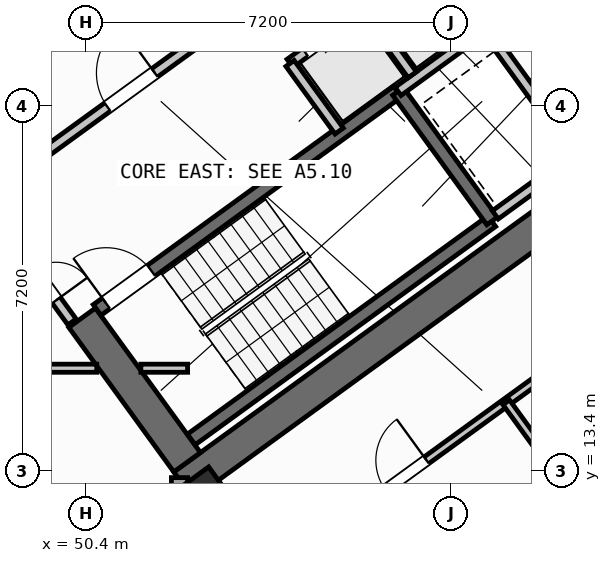
"""IFC4 building model, lengths in metres.
Left out: names, types, materials, properties, quantities, classifications, styles, units other than length and angle.
Written with IfcOpenShell. Run it as: python <this file> out.ifc"""

import sys

from ifc_helpers import new_model, si_unit, direction, frame, frame_2d, origin, origin_2d, place, context, subcontext, project, spatial, rectangle, hollow_rectangle, extrude, source, transform, mapped, element, fill, save


model = new_model("IFC4")
c1 = context("Model", 3, precision=1e-05, world=origin(), true_north=direction((0.0, 1.0)))
c2 = subcontext(c1, "Body", "Model", "MODEL_VIEW")
j1 = project(units=[si_unit("LENGTHUNIT", "METRE"), si_unit("PLANEANGLEUNIT", "RADIAN")], contexts=[c1])
p1 = place(None, origin())
s1 = spatial("IfcSite", under=j1, at=p1, CompositionType="ELEMENT")
p2 = place(p1, origin())
s2 = spatial("IfcBuilding", under=s1, at=p2, CompositionType="ELEMENT")
p3 = place(p2, frame((0.0, 0.0, 34.8)))
s3 = spatial("IfcBuildingStorey", under=s2, at=p3, CompositionType="ELEMENT", Elevation=34.8)
p4 = place(p3, frame((52.318, 13.11, 0.0), z_axis=(0.0, 0.0, 1.0), x_axis=(0.809019445368, 0.587781878776, 0.0)))
e1 = element("IfcWall", 1, at=p4, inside=s3, PredefinedType="SHEAR", context=c2, shape_type="SweptSolid", body=[
    extrude(rectangle(XDim=12.44, YDim=0.65, at=frame_2d((6.22, 0.0))), origin(), (0.0, 0.0, 1.0), 3.35),
])
p5 = place(p3, frame((52.39, 13.564, 0.0), z_axis=(0.0, 0.0, 1.0), x_axis=(-0.58779688989, 0.809008539037, 0.0)))
e2 = element("IfcWall", 2, at=p5, inside=s3, PredefinedType="SHEAR", context=c2, shape_type="SweptSolid", body=[
    extrude(rectangle(XDim=3.525, YDim=0.65, at=frame_2d((1.763, 0.0))), origin(), (0.0, 0.0, 1.0), 3.35),
])
m1 = source(origin(), c2, "Body", "SweptSolid", [
    extrude(hollow_rectangle(XDim=1.0, YDim=1.0, WallThickness=0.04, at=origin_2d()), origin(), (0.0, 0.0, 1.0), 3.6),
])
p6 = place(p3, frame((52.705, 12.773, 0.0), z_axis=(0.0, 0.0, 1.0), x_axis=(0.809016994375, 0.587785252292, 0.0)))
e3 = element("IfcColumn", 3, at=p6, inside=s3, PredefinedType="COLUMN", context=c2, shape_type="MappedRepresentation", body=[
    mapped(m1, transform((0.0, 0.0, 0.0), scale=1.0)),
])
p7 = place(p3, frame((58.455, 35.484, 0.0), z_axis=(0.0, 0.0, 1.0), x_axis=(0.587783625747, -0.809018176127, 0.0)))
e4 = element("IfcWall", 4, at=p7, inside=s3, PredefinedType="STANDARD", context=c2, shape_type="SweptSolid", body=[
    extrude(rectangle(XDim=21.587, YDim=0.32, at=frame_2d((10.794, 0.0))), origin(), (0.0, 0.0, 1.0), 2.725),
])
p8 = place(p7, frame((1.529, 0.0, 0.85)))
e5 = element("IfcOpeningElement", 5, at=p8, cuts=e4, PredefinedType="OPENING", context=c2, shape_type="SweptSolid", body=[
    extrude(rectangle(XDim=1.8, YDim=1.5, at=frame_2d((0.9, 0.75))), frame((0.0, 0.17, 0.0), z_axis=(0.0, -1.0, 0.0), x_axis=(1.0, 0.0, 0.0)), (0.0, 0.0, 1.0), 0.34),
])
p9 = place(p7, frame((10.444, 0.0, 0.85)))
e6 = element("IfcOpeningElement", 6, at=p9, cuts=e4, PredefinedType="OPENING", context=c2, shape_type="SweptSolid", body=[
    extrude(rectangle(XDim=1.8, YDim=1.5, at=frame_2d((0.9, 0.75))), frame((0.0, 0.17, 0.0), z_axis=(0.0, -1.0, 0.0), x_axis=(1.0, 0.0, 0.0)), (0.0, 0.0, 1.0), 0.34),
])
p10 = place(p7, frame((17.595, 0.0, 0.85)))
e7 = element("IfcOpeningElement", 7, at=p10, cuts=e4, PredefinedType="OPENING", context=c2, shape_type="SweptSolid", body=[
    extrude(rectangle(XDim=1.5, YDim=1.5, at=frame_2d((0.75, 0.75))), frame((0.0, 0.17, 0.0), z_axis=(0.0, -1.0, 0.0), x_axis=(1.0, 0.0, 0.0)), (0.0, 0.0, 1.0), 0.34),
])
p11 = place(p3, frame((71.098, 17.731, 0.0), z_axis=(0.0, 0.0, 1.0), x_axis=(-0.809021120468, -0.587779573171, 0.0)))
e8 = element("IfcWall", 8, at=p11, inside=s3, PredefinedType="STANDARD", context=c2, shape_type="SweptSolid", body=[
    extrude(rectangle(XDim=17.588, YDim=0.32, at=frame_2d((8.794, 0.0))), origin(), (0.0, 0.0, 1.0), 3.35),
])
p12 = place(p11, frame((1.624, 0.0, 0.0)))
e9 = element("IfcOpeningElement", 9, at=p12, cuts=e8, PredefinedType="OPENING", context=c2, shape_type="SweptSolid", body=[
    extrude(rectangle(XDim=1.05, YDim=2.15, at=frame_2d((0.525, 1.075))), frame((0.0, 0.17, 0.0), z_axis=(0.0, -1.0, 0.0), x_axis=(1.0, 0.0, 0.0)), (0.0, 0.0, 1.0), 0.34),
])
p13 = place(p11, frame((4.104, 0.0, 1.0)))
e10 = element("IfcOpeningElement", 10, at=p13, cuts=e8, PredefinedType="OPENING", context=c2, shape_type="SweptSolid", body=[
    extrude(rectangle(XDim=0.9, YDim=1.25, at=frame_2d((0.45, 0.625))), frame((0.0, 0.17, 0.0), z_axis=(0.0, -1.0, 0.0), x_axis=(1.0, 0.0, 0.0)), (0.0, 0.0, 1.0), 0.34),
])
p14 = place(p11, frame((7.879, 0.0, 0.85)))
e11 = element("IfcOpeningElement", 11, at=p14, cuts=e8, PredefinedType="OPENING", context=c2, shape_type="SweptSolid", body=[
    extrude(rectangle(XDim=1.8, YDim=1.5, at=frame_2d((0.9, 0.75))), frame((0.0, 0.17, 0.0), z_axis=(0.0, -1.0, 0.0), x_axis=(1.0, 0.0, 0.0)), (0.0, 0.0, 1.0), 0.34),
])
p15 = place(p11, frame((13.529, 0.0, 0.85)))
e12 = element("IfcOpeningElement", 12, at=p15, cuts=e8, PredefinedType="OPENING", context=c2, shape_type="SweptSolid", body=[
    extrude(rectangle(XDim=1.5, YDim=1.5, at=frame_2d((0.75, 0.75))), frame((0.0, 0.17, 0.0), z_axis=(0.0, -1.0, 0.0), x_axis=(1.0, 0.0, 0.0)), (0.0, 0.0, 1.0), 0.34),
])
p16 = place(p3, frame((52.24, 13.261, 0.0), z_axis=(0.0, 0.0, 1.0), x_axis=(0.0, -1.0, 0.0)))
e13 = element("IfcWall", 13, at=p16, inside=s3, PredefinedType="STANDARD", context=c2, shape_type="SweptSolid", body=[
    extrude(rectangle(XDim=9.795, YDim=0.32, at=frame_2d((4.897, 0.0))), origin(), (0.0, 0.0, 1.0), 3.35),
])
p17 = place(p16, frame((2.199, 0.0, 0.8)))
e14 = element("IfcOpeningElement", 14, at=p17, cuts=e13, PredefinedType="OPENING", context=c2, shape_type="SweptSolid", body=[
    extrude(rectangle(XDim=2.1, YDim=1.55, at=frame_2d((1.05, 0.775))), frame((0.0, 0.17, 0.0), z_axis=(0.0, -1.0, 0.0), x_axis=(1.0, 0.0, 0.0)), (0.0, 0.0, 1.0), 0.34),
])
p18 = place(p16, frame((6.88, 0.0, 0.85)))
e15 = element("IfcOpeningElement", 15, at=p18, cuts=e13, PredefinedType="OPENING", context=c2, shape_type="SweptSolid", body=[
    extrude(rectangle(XDim=1.8, YDim=1.5, at=frame_2d((0.9, 0.75))), frame((0.0, 0.17, 0.0), z_axis=(0.0, -1.0, 0.0), x_axis=(1.0, 0.0, 0.0)), (0.0, 0.0, 1.0), 0.34),
])
p19 = place(p3, frame((52.472, 14.013, 0.0), z_axis=(0.0, 0.0, 1.0), x_axis=(0.809028366311, 0.587769599847, 0.0)))
e16 = element("IfcWall", 16, at=p19, inside=s3, PredefinedType="SHEAR", context=c2, shape_type="SweptSolid", body=[
    extrude(rectangle(XDim=7.33, YDim=0.26, at=frame_2d((3.665, 0.0))), origin(), (0.0, 0.0, 1.0), 3.35),
])
p20 = place(p3, frame((50.615, 16.57, 0.0), z_axis=(0.0, 0.0, 1.0), x_axis=(0.809028366311, 0.587769599847, 0.0)))
e17 = element("IfcWall", 17, at=p20, inside=s3, PredefinedType="SHEAR", context=c2, shape_type="SweptSolid", body=[
    extrude(rectangle(XDim=7.33, YDim=0.26, at=frame_2d((3.665, 0.0))), origin(), (0.0, 0.0, 1.0), 3.35),
])
p21 = place(p20, frame((0.22, 0.0, 0.0)))
e18 = element("IfcOpeningElement", 18, at=p21, cuts=e17, PredefinedType="OPENING", context=c2, shape_type="SweptSolid", body=[
    extrude(rectangle(XDim=1.1, YDim=2.1, at=frame_2d((0.55, 1.05))), frame((0.0, 0.14, 0.0), z_axis=(0.0, -1.0, 0.0), x_axis=(1.0, 0.0, 0.0)), (0.0, 0.0, 1.0), 0.28),
])
p22 = place(p3, frame((58.41, 18.327, 0.0), z_axis=(0.0, 0.0, 1.0), x_axis=(-0.58776738483, 0.809029975545, 0.0)))
e19 = element("IfcWall", 19, at=p22, inside=s3, PredefinedType="SHEAR", context=c2, shape_type="SweptSolid", body=[
    extrude(rectangle(XDim=3.16, YDim=0.26, at=frame_2d((1.58, 0.0))), origin(), (0.0, 0.0, 1.0), 3.35),
])
p23 = place(p3, frame((47.106, 21.437, 0.0), z_axis=(0.0, 0.0, 1.0), x_axis=(0.809012514015, 0.58779141893, 0.0)))
e20 = element("IfcWall", 20, at=p23, inside=s3, PredefinedType="STANDARD", context=c2, shape_type="SweptSolid", body=[
    extrude(rectangle(XDim=3.398, YDim=0.2, at=frame_2d((1.699, 0.0))), origin(), (0.0, 0.0, 1.0), 3.34),
])
p24 = place(p23, frame((0.408, 0.0, 0.0)))
e21 = element("IfcOpeningElement", 21, at=p24, cuts=e20, PredefinedType="OPENING", context=c2, shape_type="SweptSolid", body=[
    extrude(rectangle(XDim=1.3, YDim=2.2, at=frame_2d((0.65, 1.1))), frame((0.0, 0.11, 0.0), z_axis=(0.0, -1.0, 0.0), x_axis=(1.0, 0.0, 0.0)), (0.0, 0.0, 1.0), 0.22),
])
p25 = place(p3, frame((48.799, 19.107, 0.0), z_axis=(0.0, 0.0, 1.0), x_axis=(0.809012959416, 0.587790805897, 0.0)))
e22 = element("IfcWall", 22, at=p25, inside=s3, PredefinedType="STANDARD", context=c2, shape_type="SweptSolid", body=[
    extrude(rectangle(XDim=5.718, YDim=0.2, at=frame_2d((2.859, 0.0))), origin(), (0.0, 0.0, 1.0), 3.34),
])
p26 = place(p25, frame((2.498, 0.0, 0.0)))
e23 = element("IfcOpeningElement", 23, at=p26, cuts=e22, PredefinedType="OPENING", context=c2, shape_type="SweptSolid", body=[
    extrude(rectangle(XDim=1.15, YDim=2.1, at=frame_2d((0.575, 1.05))), frame((0.0, 0.11, 0.0), z_axis=(0.0, -1.0, 0.0), x_axis=(1.0, 0.0, 0.0)), (0.0, 0.0, 1.0), 0.22),
])
p27 = place(p3, frame((56.553, 20.884, 0.0), z_axis=(0.0, 0.0, 1.0), x_axis=(0.809035789462, 0.587759382205, 0.0)))
e24 = element("IfcWall", 24, at=p27, inside=s3, PredefinedType="STANDARD", context=c2, shape_type="SweptSolid", body=[
    extrude(rectangle(XDim=3.768, YDim=0.2, at=frame_2d((1.884, 0.0))), origin(), (0.0, 0.0, 1.0), 3.34),
])
p28 = place(p27, frame((2.65, 0.0, 0.0)))
e25 = element("IfcOpeningElement", 25, at=p28, cuts=e24, PredefinedType="OPENING", context=c2, shape_type="SweptSolid", body=[
    extrude(rectangle(XDim=0.86, YDim=2.05, at=frame_2d((0.43, 1.025))), frame((0.0, 0.11, 0.0), z_axis=(0.0, -1.0, 0.0), x_axis=(1.0, 0.0, 0.0)), (0.0, 0.0, 1.0), 0.22),
])
p29 = place(p3, frame((54.421, 21.436, 0.0), z_axis=(0.0, 0.0, 1.0), x_axis=(0.809013710463, 0.587789772183, 0.0)))
e26 = element("IfcWall", 26, at=p29, inside=s3, PredefinedType="STANDARD", context=c2, shape_type="SweptSolid", body=[
    extrude(rectangle(XDim=5.36, YDim=0.2, at=frame_2d((2.68, 0.0))), origin(), (0.0, 0.0, 1.0), 3.34),
])
p30 = place(p29, frame((0.37, 0.0, 0.0)))
e27 = element("IfcOpeningElement", 27, at=p30, cuts=e26, PredefinedType="OPENING", context=c2, shape_type="SweptSolid", body=[
    extrude(rectangle(XDim=1.1, YDim=2.15, at=frame_2d((0.55, 1.075))), frame((0.0, 0.11, 0.0), z_axis=(0.0, -1.0, 0.0), x_axis=(1.0, 0.0, 0.0)), (0.0, 0.0, 1.0), 0.22),
])
p31 = place(p29, frame((2.17, 0.0, 0.0)))
e28 = element("IfcOpeningElement", 28, at=p31, cuts=e26, PredefinedType="OPENING", context=c2, shape_type="SweptSolid", body=[
    extrude(rectangle(XDim=1.1, YDim=2.15, at=frame_2d((0.55, 1.075))), frame((0.0, 0.11, 0.0), z_axis=(0.0, -1.0, 0.0), x_axis=(1.0, 0.0, 0.0)), (0.0, 0.0, 1.0), 0.22),
])
p32 = place(p29, frame((3.97, 0.0, 0.0)))
e29 = element("IfcOpeningElement", 29, at=p32, cuts=e26, PredefinedType="OPENING", context=c2, shape_type="SweptSolid", body=[
    extrude(rectangle(XDim=1.1, YDim=2.15, at=frame_2d((0.55, 1.075))), frame((0.0, 0.11, 0.0), z_axis=(0.0, -1.0, 0.0), x_axis=(1.0, 0.0, 0.0)), (0.0, 0.0, 1.0), 0.22),
])
p33 = place(p3, frame((55.391, 20.102, 0.0), z_axis=(0.0, 0.0, 1.0), x_axis=(-0.58778447739, 0.809017557374, 0.0)))
e30 = element("IfcWall", 30, at=p33, inside=s3, PredefinedType="STANDARD", context=c2, shape_type="SweptSolid", body=[
    extrude(rectangle(XDim=1.65, YDim=0.2, at=frame_2d((0.825, 0.0))), origin(), (0.0, 0.0, 1.0), 3.34),
])
p34 = place(p3, frame((56.834, 21.212, 0.0), z_axis=(0.0, 0.0, 1.0), x_axis=(-0.58776738483, 0.809029975545, 0.0)))
e31 = element("IfcWall", 31, at=p34, inside=s3, PredefinedType="STANDARD", context=c2, shape_type="SweptSolid", body=[
    extrude(rectangle(XDim=1.58, YDim=0.2, at=frame_2d((0.79, 0.0))), origin(), (0.0, 0.0, 1.0), 3.34),
])
p35 = place(p3, frame((60.067, 19.655, 0.0), z_axis=(0.0, 0.0, 1.0), x_axis=(-0.587800520745, 0.809005900975, 0.0)))
e32 = element("IfcWall", 32, at=p35, inside=s3, PredefinedType="STANDARD", context=c2, shape_type="SweptSolid", body=[
    extrude(rectangle(XDim=2.66, YDim=0.2, at=frame_2d((1.33, 0.0))), origin(), (0.0, 0.0, 1.0), 3.34),
])
p36 = place(p3, frame((58.472, 18.447, 0.0), z_axis=(0.0, 0.0, 1.0), x_axis=(0.809022487728, 0.587777691266, 0.0)))
e33 = element("IfcWall", 33, at=p36, inside=s3, PredefinedType="STANDARD", context=c2, shape_type="SweptSolid", body=[
    extrude(rectangle(XDim=3.648, YDim=0.2, at=frame_2d((1.824, 0.0))), origin(), (0.0, 0.0, 1.0), 3.34),
])
p37 = place(p3, frame((35.296, 15.42, 0.0), z_axis=(0.0, 0.0, 1.0), x_axis=(1.0, 0.0, 0.0)))
e34 = element("IfcWall", 34, at=p37, inside=s3, PredefinedType="PARTITIONING", context=c2, shape_type="SweptSolid", body=[
    extrude(rectangle(XDim=15.311, YDim=0.16, at=frame_2d((7.655, 0.0))), origin(), (0.0, 0.0, 1.0), 3.34),
])
p38 = place(p37, frame((0.91, 0.0, 0.0)))
e35 = element("IfcOpeningElement", 35, at=p38, cuts=e34, PredefinedType="OPENING", context=c2, shape_type="SweptSolid", body=[
    extrude(rectangle(XDim=1.0, YDim=2.1, at=frame_2d((0.5, 1.05))), frame((0.0, 0.09, 0.0), z_axis=(0.0, -1.0, 0.0), x_axis=(1.0, 0.0, 0.0)), (0.0, 0.0, 1.0), 0.18),
])
p39 = place(p37, frame((8.74, 0.0, 0.0)))
e36 = element("IfcOpeningElement", 36, at=p39, cuts=e34, PredefinedType="OPENING", context=c2, shape_type="SweptSolid", body=[
    extrude(rectangle(XDim=1.0, YDim=2.1, at=frame_2d((0.5, 1.05))), frame((0.0, 0.09, 0.0), z_axis=(0.0, -1.0, 0.0), x_axis=(1.0, 0.0, 0.0)), (0.0, 0.0, 1.0), 0.18),
])
p40 = place(p3, frame((51.477, 15.42, 0.0), z_axis=(0.0, 0.0, 1.0), x_axis=(1.0, 0.0, 0.0)))
e37 = element("IfcWall", 37, at=p40, inside=s3, PredefinedType="PARTITIONING", context=c2, shape_type="SweptSolid", body=[
    extrude(rectangle(XDim=0.923, YDim=0.16, at=frame_2d((0.461, 0.0))), origin(), (0.0, 0.0, 1.0), 3.34),
])
p41 = place(p3, frame((50.119, 16.333, 0.0), z_axis=(0.0, 0.0, 1.0), x_axis=(-0.587749856981, 0.809042709391, 0.0)))
e38 = element("IfcWall", 38, at=p41, inside=s3, PredefinedType="STANDARD", context=c2, shape_type="SweptSolid", body=[
    extrude(rectangle(XDim=2.96, YDim=0.2, at=frame_2d((1.48, 0.0))), origin(), (0.0, 0.0, 1.0), 3.34),
])
p42 = place(p41, frame((0.53, 0.0, 0.0)))
e39 = element("IfcOpeningElement", 39, at=p42, cuts=e38, PredefinedType="OPENING", context=c2, shape_type="SweptSolid", body=[
    extrude(rectangle(XDim=1.5, YDim=2.15, at=frame_2d((0.75, 1.075))), frame((0.0, 0.11, 0.0), z_axis=(0.0, -1.0, 0.0), x_axis=(1.0, 0.0, 0.0)), (0.0, 0.0, 1.0), 0.22),
])
p43 = place(p3, frame((53.705, 11.126, 0.0), z_axis=(0.0, 0.0, 1.0), x_axis=(0.809014504436, 0.587788679384, 0.0)))
e40 = element("IfcWall", 40, at=p43, inside=s3, PredefinedType="PARTITIONING", context=c2, shape_type="SweptSolid", body=[
    extrude(rectangle(XDim=14.67, YDim=0.16, at=frame_2d((7.335, 0.0))), origin(), (0.0, 0.0, 1.0), 3.34),
])
p44 = place(p43, frame((3.215, 0.0, 0.0)))
e41 = element("IfcOpeningElement", 41, at=p44, cuts=e40, PredefinedType="OPENING", context=c2, shape_type="SweptSolid", body=[
    extrude(rectangle(XDim=1.0, YDim=2.1, at=frame_2d((0.5, 1.05))), frame((0.0, 0.09, 0.0), z_axis=(0.0, -1.0, 0.0), x_axis=(1.0, 0.0, 0.0)), (0.0, 0.0, 1.0), 0.18),
])
p45 = place(p43, frame((9.915, 0.0, 0.0)))
e42 = element("IfcOpeningElement", 42, at=p45, cuts=e40, PredefinedType="OPENING", context=c2, shape_type="SweptSolid", body=[
    extrude(rectangle(XDim=1.0, YDim=2.1, at=frame_2d((0.5, 1.05))), frame((0.0, 0.09, 0.0), z_axis=(0.0, -1.0, 0.0), x_axis=(1.0, 0.0, 0.0)), (0.0, 0.0, 1.0), 0.18),
])
p46 = place(p3, frame((61.539, 10.823, 0.0), z_axis=(0.0, 0.0, 1.0), x_axis=(-0.587785532001, 0.809016791155, 0.0)))
e43 = element("IfcWall", 43, at=p46, inside=s3, PredefinedType="PARTITIONING", context=c2, shape_type="SweptSolid", body=[
    extrude(rectangle(XDim=4.85, YDim=0.16, at=frame_2d((2.425, 0.0))), origin(), (0.0, 0.0, 1.0), 3.34),
])
m2 = source(origin(), c2, "Body", "SweptSolid", [
    extrude(rectangle(XDim=1.1, YDim=2.1, at=frame_2d((0.55, 1.05))), frame((0.0, 0.025, 0.0), z_axis=(0.0, -1.0, 0.0), x_axis=(1.0, 0.0, 0.0)), (0.0, 0.0, 1.0), 0.05),
])
p47 = place(p21, origin())
e44 = element("IfcDoor", 44, at=p47, inside=s3, OperationType="SINGLE_SWING_LEFT", PredefinedType="DOOR", context=c2, shape_type="MappedRepresentation", body=[
    mapped(m2, transform((0.0, 0.0, 0.0), scale=1.0)),
])
fill(e18, e44)
m3 = source(origin(), c2, "Body", "SweptSolid", [
    extrude(rectangle(XDim=1.15, YDim=2.1, at=frame_2d((0.575, 1.05))), frame((0.0, 0.025, 0.0), z_axis=(0.0, -1.0, 0.0), x_axis=(1.0, 0.0, 0.0)), (0.0, 0.0, 1.0), 0.05),
])
p48 = place(p26, origin())
e45 = element("IfcDoor", 45, at=p48, inside=s3, OperationType="SINGLE_SWING_RIGHT", PredefinedType="DOOR", context=c2, shape_type="MappedRepresentation", body=[
    mapped(m3, transform((0.0, 0.0, 0.0), scale=1.0)),
])
fill(e23, e45)
m4 = source(origin(), c2, "Body", "SweptSolid", [
    extrude(rectangle(XDim=1.1, YDim=2.15, at=frame_2d((0.55, 1.075))), frame((0.0, 0.025, 0.0), z_axis=(0.0, -1.0, 0.0), x_axis=(1.0, 0.0, 0.0)), (0.0, 0.0, 1.0), 0.05),
])
p49 = place(p30, origin())
e46 = element("IfcDoor", 46, at=p49, inside=s3, OperationType="DOUBLE_DOOR_SLIDING", PredefinedType="DOOR", context=c2, shape_type="MappedRepresentation", body=[
    mapped(m4, transform((0.0, 0.0, 0.0), scale=1.0)),
])
fill(e27, e46)
m5 = source(origin(), c2, "Body", "SweptSolid", [
    extrude(rectangle(XDim=1.5, YDim=2.15, at=frame_2d((0.75, 1.075))), frame((0.0, 0.025, 0.0), z_axis=(0.0, -1.0, 0.0), x_axis=(1.0, 0.0, 0.0)), (0.0, 0.0, 1.0), 0.05),
])
p50 = place(p42, frame((1.5, 0.0, 0.0), z_axis=(0.0, 0.0, 1.0), x_axis=(-1.0, 0.0, 0.0)))
e47 = element("IfcDoor", 47, at=p50, inside=s3, OperationType="DOUBLE_DOOR_SINGLE_SWING", PredefinedType="DOOR", context=c2, shape_type="MappedRepresentation", body=[
    mapped(m5, transform((0.0, 0.0, 0.0), scale=1.0)),
])
fill(e39, e47)
m6 = source(origin(), c2, "Body", "SweptSolid", [
    extrude(rectangle(XDim=1.0, YDim=2.1, at=frame_2d((0.5, 1.05))), frame((0.0, 0.025, 0.0), z_axis=(0.0, -1.0, 0.0), x_axis=(1.0, 0.0, 0.0)), (0.0, 0.0, 1.0), 0.05),
])
p51 = place(p44, origin())
e48 = element("IfcDoor", 48, at=p51, inside=s3, OperationType="SINGLE_SWING_RIGHT", PredefinedType="DOOR", context=c2, shape_type="MappedRepresentation", body=[
    mapped(m6, transform((0.0, 0.0, 0.0), scale=1.0)),
])
fill(e41, e48)
save(model, sys.argv[1])
